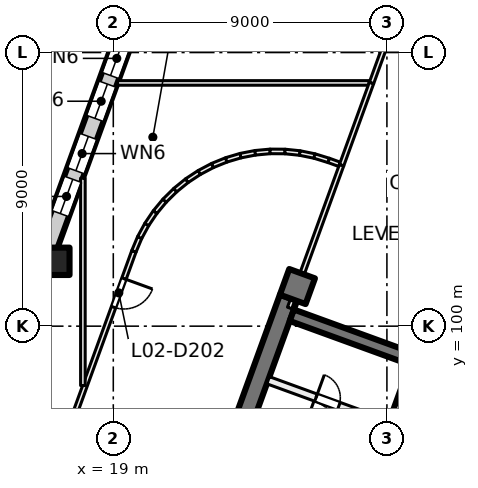
"""IFC4 building model, lengths in metres.
Left out: names, types, materials, properties, quantities, classifications, styles, units other than length and angle.
Written with IfcOpenShell. Run it as: python <this file> out.ifc"""

import sys

from ifc_helpers import new_model, si_unit, direction, frame, frame_2d, origin, origin_2d, place, context, subcontext, project, spatial, rectangle, extrude, element, fill, save


model = new_model("IFC4")
c1 = context("Model", 3, precision=1e-05, world=origin(), true_north=direction((0.0, 1.0)))
c2 = subcontext(c1, "Body", "Model", "MODEL_VIEW")
j1 = project(units=[si_unit("LENGTHUNIT", "METRE"), si_unit("PLANEANGLEUNIT", "RADIAN")], contexts=[c1])
p1 = place(None, origin())
s1 = spatial("IfcSite", under=j1, at=p1, CompositionType="ELEMENT")
p2 = place(p1, origin())
s2 = spatial("IfcBuilding", under=s1, at=p2, CompositionType="ELEMENT")
p3 = place(p2, frame((0.0, 0.0, 12.5)))
s3 = spatial("IfcBuildingStorey", under=s2, at=p3, CompositionType="ELEMENT", Elevation=12.5)
for number, where, z_axis, x_axis in (
    (1, (17.111, 102.133, 0.0), (0.0, 0.0, 1.0), (1.0, 0.0, 0.0)),
    (2, (25.056, 101.303, 0.0), (0.0, 0.0, 1.0), (-0.342, -0.94, 0.0)),
):
    element("IfcColumn", number, at=place(p3, frame(where, z_axis=z_axis, x_axis=x_axis)), inside=s3, PredefinedType="COLUMN", context=c2, shape_type="SweptSolid", body=[
        extrude(rectangle(XDim=0.9, YDim=0.9, at=origin_2d()), origin(), (0.0, 0.0, 1.0), 5.0),
    ])
p4 = place(p3, frame((21.717, 92.568, 0.0), z_axis=(0.0, 0.0, 1.0), x_axis=(0.342016162452, 0.939694069696, 0.0)))
e3 = element("IfcWall", 3, at=p4, inside=s3, PredefinedType="SHEAR", context=c2, shape_type="SweptSolid", body=[
    extrude(rectangle(XDim=8.9, YDim=0.6, at=frame_2d((4.45, 0.0))), origin(), (0.0, 0.0, 1.0), 5.0),
])
p5 = place(p3, frame((32.953, 97.418, 0.0), z_axis=(0.0, 0.0, 1.0), x_axis=(-0.93969060187, 0.342025690201, 0.0)))
e4 = element("IfcWall", 4, at=p5, inside=s3, PredefinedType="SHEAR", context=c2, shape_type="SweptSolid", body=[
    extrude(rectangle(XDim=8.6, YDim=0.4, at=frame_2d((4.3, 0.0))), origin(), (0.0, 0.0, 1.0), 5.0),
])
p6 = place(p3, frame((12.199, 89.809, 0.0), z_axis=(0.0, 0.0, 1.0), x_axis=(0.342022998908, 0.939691581434, 0.0)))
e5 = element("IfcWall", 5, at=p6, inside=s3, PredefinedType="SOLIDWALL", context=c2, shape_type="SweptSolid", body=[
    extrude(rectangle(XDim=47.334, YDim=0.6, at=frame_2d((23.667, 0.0))), origin(), (0.0, 0.0, 1.0), 4.6),
])
p7 = place(p6, frame((0.773, 0.0, 0.9)))
e6 = element("IfcOpeningElement", 6, at=p7, cuts=e5, PredefinedType="OPENING", context=c2, shape_type="SweptSolid", body=[
    extrude(rectangle(XDim=3.0, YDim=3.0, at=frame_2d((1.5, 1.5))), frame((0.0, 0.31, 0.0), z_axis=(0.0, -1.0, 0.0), x_axis=(1.0, 0.0, 0.0)), (0.0, 0.0, 1.0), 0.62),
])
p8 = place(p6, frame((5.379, 0.0, 0.9)))
e7 = element("IfcOpeningElement", 7, at=p8, cuts=e5, PredefinedType="OPENING", context=c2, shape_type="SweptSolid", body=[
    extrude(rectangle(XDim=3.0, YDim=3.0, at=frame_2d((1.5, 1.5))), frame((0.0, 0.31, 0.0), z_axis=(0.0, -1.0, 0.0), x_axis=(1.0, 0.0, 0.0)), (0.0, 0.0, 1.0), 0.62),
])
p9 = place(p6, frame((9.235, 0.0, 0.9)))
e8 = element("IfcOpeningElement", 8, at=p9, cuts=e5, PredefinedType="OPENING", context=c2, shape_type="SweptSolid", body=[
    extrude(rectangle(XDim=3.0, YDim=3.0, at=frame_2d((1.5, 1.5))), frame((0.0, 0.31, 0.0), z_axis=(0.0, -1.0, 0.0), x_axis=(1.0, 0.0, 0.0)), (0.0, 0.0, 1.0), 0.62),
])
p10 = place(p6, frame((14.786, 0.0, 0.9)))
e9 = element("IfcOpeningElement", 9, at=p10, cuts=e5, PredefinedType="OPENING", context=c2, shape_type="SweptSolid", body=[
    extrude(rectangle(XDim=1.2, YDim=3.0, at=frame_2d((0.6, 1.5))), frame((0.0, 0.31, 0.0), z_axis=(0.0, -1.0, 0.0), x_axis=(1.0, 0.0, 0.0)), (0.0, 0.0, 1.0), 0.62),
])
p11 = place(p6, frame((16.286, 0.0, 0.9)))
e10 = element("IfcOpeningElement", 10, at=p11, cuts=e5, PredefinedType="OPENING", context=c2, shape_type="SweptSolid", body=[
    extrude(rectangle(XDim=1.2, YDim=3.0, at=frame_2d((0.6, 1.5))), frame((0.0, 0.31, 0.0), z_axis=(0.0, -1.0, 0.0), x_axis=(1.0, 0.0, 0.0)), (0.0, 0.0, 1.0), 0.62),
])
p12 = place(p6, frame((18.118, 0.0, 0.9)))
e11 = element("IfcOpeningElement", 11, at=p12, cuts=e5, PredefinedType="OPENING", context=c2, shape_type="SweptSolid", body=[
    extrude(rectangle(XDim=1.2, YDim=3.0, at=frame_2d((0.6, 1.5))), frame((0.0, 0.31, 0.0), z_axis=(0.0, -1.0, 0.0), x_axis=(1.0, 0.0, 0.0)), (0.0, 0.0, 1.0), 0.62),
])
p13 = place(p6, frame((19.618, 0.0, 0.9)))
e12 = element("IfcOpeningElement", 12, at=p13, cuts=e5, PredefinedType="OPENING", context=c2, shape_type="SweptSolid", body=[
    extrude(rectangle(XDim=1.2, YDim=3.0, at=frame_2d((0.6, 1.5))), frame((0.0, 0.31, 0.0), z_axis=(0.0, -1.0, 0.0), x_axis=(1.0, 0.0, 0.0)), (0.0, 0.0, 1.0), 0.62),
])
p14 = place(p6, frame((22.452, 0.0, 0.9)))
e13 = element("IfcOpeningElement", 13, at=p14, cuts=e5, PredefinedType="OPENING", context=c2, shape_type="SweptSolid", body=[
    extrude(rectangle(XDim=3.0, YDim=3.0, at=frame_2d((1.5, 1.5))), frame((0.0, 0.31, 0.0), z_axis=(0.0, -1.0, 0.0), x_axis=(1.0, 0.0, 0.0)), (0.0, 0.0, 1.0), 0.62),
])
p15 = place(p6, frame((26.458, 0.0, 0.9)))
e14 = element("IfcOpeningElement", 14, at=p15, cuts=e5, PredefinedType="OPENING", context=c2, shape_type="SweptSolid", body=[
    extrude(rectangle(XDim=3.0, YDim=3.0, at=frame_2d((1.5, 1.5))), frame((0.0, 0.31, 0.0), z_axis=(0.0, -1.0, 0.0), x_axis=(1.0, 0.0, 0.0)), (0.0, 0.0, 1.0), 0.62),
])
p16 = place(p6, frame((31.064, 0.0, 0.9)))
e15 = element("IfcOpeningElement", 15, at=p16, cuts=e5, PredefinedType="OPENING", context=c2, shape_type="SweptSolid", body=[
    extrude(rectangle(XDim=3.0, YDim=3.0, at=frame_2d((1.5, 1.5))), frame((0.0, 0.31, 0.0), z_axis=(0.0, -1.0, 0.0), x_axis=(1.0, 0.0, 0.0)), (0.0, 0.0, 1.0), 0.62),
])
p17 = place(p6, frame((36.029, 0.0, 0.9)))
e16 = element("IfcOpeningElement", 16, at=p17, cuts=e5, PredefinedType="OPENING", context=c2, shape_type="SweptSolid", body=[
    extrude(rectangle(XDim=1.2, YDim=3.0, at=frame_2d((0.6, 1.5))), frame((0.0, 0.31, 0.0), z_axis=(0.0, -1.0, 0.0), x_axis=(1.0, 0.0, 0.0)), (0.0, 0.0, 1.0), 0.62),
])
p18 = place(p6, frame((39.676, 0.0, 0.9)))
e17 = element("IfcOpeningElement", 17, at=p18, cuts=e5, PredefinedType="OPENING", context=c2, shape_type="SweptSolid", body=[
    extrude(rectangle(XDim=3.0, YDim=3.0, at=frame_2d((1.5, 1.5))), frame((0.0, 0.31, 0.0), z_axis=(0.0, -1.0, 0.0), x_axis=(1.0, 0.0, 0.0)), (0.0, 0.0, 1.0), 0.62),
])
p19 = place(p6, frame((43.531, 0.0, 0.9)))
e18 = element("IfcOpeningElement", 18, at=p19, cuts=e5, PredefinedType="OPENING", context=c2, shape_type="SweptSolid", body=[
    extrude(rectangle(XDim=3.0, YDim=3.0, at=frame_2d((1.5, 1.5))), frame((0.0, 0.31, 0.0), z_axis=(0.0, -1.0, 0.0), x_axis=(1.0, 0.0, 0.0)), (0.0, 0.0, 1.0), 0.62),
])
p20 = place(p3, frame((24.094, 98.221, 0.0), z_axis=(0.0, 0.0, 1.0), x_axis=(0.939691552312, -0.342023078919, 0.0)))
e19 = element("IfcWall", 19, at=p20, inside=s3, PredefinedType="PARTITIONING", context=c2, shape_type="SweptSolid", body=[
    extrude(rectangle(XDim=8.4, YDim=0.25, at=frame_2d((4.2, 0.0))), origin(), (0.0, 0.0, 1.0), 4.6),
])
p21 = place(p20, frame((5.925, 0.0, 0.0)))
e20 = element("IfcOpeningElement", 20, at=p21, cuts=e19, PredefinedType="OPENING", context=c2, shape_type="SweptSolid", body=[
    extrude(rectangle(XDim=0.8, YDim=2.1, at=frame_2d((0.4, 1.05))), frame((0.0, 0.135, 0.0), z_axis=(0.0, -1.0, 0.0), x_axis=(1.0, 0.0, 0.0)), (0.0, 0.0, 1.0), 0.27),
])
p22 = place(p20, frame((1.675, 0.0, 0.0)))
e21 = element("IfcOpeningElement", 21, at=p22, cuts=e19, PredefinedType="OPENING", context=c2, shape_type="SweptSolid", body=[
    extrude(rectangle(XDim=0.8, YDim=2.1, at=frame_2d((0.4, 1.05))), frame((0.0, 0.135, 0.0), z_axis=(0.0, -1.0, 0.0), x_axis=(1.0, 0.0, 0.0)), (0.0, 0.0, 1.0), 0.27),
])
p23 = place(p3, frame((28.083, 96.902, 0.0), z_axis=(0.0, 0.0, 1.0), x_axis=(0.342024501273, 0.939691034611, 0.0)))
e22 = element("IfcWall", 22, at=p23, inside=s3, PredefinedType="PARTITIONING", context=c2, shape_type="SweptSolid", body=[
    extrude(rectangle(XDim=1.95, YDim=0.1, at=frame_2d((0.975, 0.0))), origin(), (0.0, 0.0, 1.0), 4.6),
])
p24 = place(p3, frame((15.169, 90.075, 0.0), z_axis=(0.0, 0.0, 1.0), x_axis=(0.342068648332, 0.93967496499, 0.0)))
e23 = element("IfcWall", 23, at=p24, inside=s3, PredefinedType="PARTITIONING", context=c2, shape_type="SweptSolid", body=[
    extrude(rectangle(XDim=13.185, YDim=0.15, at=frame_2d((6.592, 0.0))), origin(), (0.0, 0.0, 1.0), 4.6),
])
p25 = place(p24, frame((3.604, 0.0, 0.0)))
e24 = element("IfcOpeningElement", 24, at=p25, cuts=e23, PredefinedType="OPENING", context=c2, shape_type="SweptSolid", body=[
    extrude(rectangle(XDim=1.0, YDim=2.1, at=frame_2d((0.5, 1.05))), frame((0.0, 0.085, 0.0), z_axis=(0.0, -1.0, 0.0), x_axis=(1.0, 0.0, 0.0)), (0.0, 0.0, 1.0), 0.17),
])
p26 = place(p24, frame((11.227, 0.0, 0.0)))
e25 = element("IfcOpeningElement", 25, at=p26, cuts=e23, PredefinedType="OPENING", context=c2, shape_type="SweptSolid", body=[
    extrude(rectangle(XDim=1.0, YDim=2.1, at=frame_2d((0.5, 1.05))), frame((0.0, 0.085, 0.0), z_axis=(0.0, -1.0, 0.0), x_axis=(1.0, 0.0, 0.0)), (0.0, 0.0, 1.0), 0.17),
])
p27 = place(p3, frame((18.0, 98.046, 0.0), z_axis=(0.0, 0.0, 1.0), x_axis=(0.0, 1.0, 0.0)))
e26 = element("IfcWall", 26, at=p27, inside=s3, PredefinedType="PARTITIONING", context=c2, shape_type="SweptSolid", body=[
    extrude(rectangle(XDim=6.823, YDim=0.15, at=frame_2d((3.412, 0.0))), origin(), (0.0, 0.0, 1.0), 4.6),
])
p28 = place(p3, frame((19.14, 108.0, 0.0), z_axis=(0.0, 0.0, 1.0), x_axis=(1.0, 0.0, 0.0)))
e27 = element("IfcWall", 27, at=p28, inside=s3, PredefinedType="PARTITIONING", context=c2, shape_type="SweptSolid", body=[
    extrude(rectangle(XDim=8.274, YDim=0.15, at=frame_2d((4.137, 0.0))), origin(), (0.0, 0.0, 1.0), 4.6),
])
p29 = place(p3, frame((19.677, 102.46, 0.0), z_axis=(0.0, 0.0, 1.0), x_axis=(0.386429931229, 0.922318767157, 0.0)))
e28 = element("IfcWall", 28, at=p29, inside=s3, PredefinedType="PARTITIONING", context=c2, shape_type="SweptSolid", body=[
    extrude(rectangle(XDim=0.497, YDim=0.15, at=frame_2d((0.248, 0.0))), origin(), (0.0, 0.0, 1.0), 4.6),
])
p30 = place(p3, frame((19.866, 102.912, 0.0), z_axis=(0.0, 0.0, 1.0), x_axis=(0.478336447807, 0.878176658025, 0.0)))
e29 = element("IfcWall", 29, at=p30, inside=s3, PredefinedType="PARTITIONING", context=c2, shape_type="SweptSolid", body=[
    extrude(rectangle(XDim=0.498, YDim=0.15, at=frame_2d((0.249, 0.0))), origin(), (0.0, 0.0, 1.0), 4.6),
])
p31 = place(p3, frame((20.1, 103.343, 0.0), z_axis=(0.0, 0.0, 1.0), x_axis=(0.559439200494, 0.828871389874, 0.0)))
e30 = element("IfcWall", 30, at=p31, inside=s3, PredefinedType="PARTITIONING", context=c2, shape_type="SweptSolid", body=[
    extrude(rectangle(XDim=0.498, YDim=0.15, at=frame_2d((0.249, 0.0))), origin(), (0.0, 0.0, 1.0), 4.6),
])
p32 = place(p3, frame((20.375, 103.75, 0.0), z_axis=(0.0, 0.0, 1.0), x_axis=(0.637426997618, 0.77051075444, 0.0)))
e31 = element("IfcWall", 31, at=p32, inside=s3, PredefinedType="PARTITIONING", context=c2, shape_type="SweptSolid", body=[
    extrude(rectangle(XDim=0.497, YDim=0.15, at=frame_2d((0.249, 0.0))), origin(), (0.0, 0.0, 1.0), 4.6),
])
p33 = place(p3, frame((20.687, 104.127, 0.0), z_axis=(0.0, 0.0, 1.0), x_axis=(0.711007970504, 0.703183948821, 0.0)))
e32 = element("IfcWall", 32, at=p33, inside=s3, PredefinedType="PARTITIONING", context=c2, shape_type="SweptSolid", body=[
    extrude(rectangle(XDim=0.499, YDim=0.15, at=frame_2d((0.25, 0.0))), origin(), (0.0, 0.0, 1.0), 4.6),
])
p34 = place(p3, frame((21.036, 104.473, 0.0), z_axis=(0.0, 0.0, 1.0), x_axis=(0.77650322697, 0.630113274345, 0.0)))
e33 = element("IfcWall", 33, at=p34, inside=s3, PredefinedType="PARTITIONING", context=c2, shape_type="SweptSolid", body=[
    extrude(rectangle(XDim=0.499, YDim=0.15, at=frame_2d((0.249, 0.0))), origin(), (0.0, 0.0, 1.0), 4.6),
])
for number, where, z_axis, x_axis in (
    (34, (21.417, 104.783, 0.0), (0.0, 0.0, 1.0), (0.835, 0.55, 0.0)),
    (35, (21.827, 105.053, 0.0), (0.0, 0.0, 1.0), (0.884, 0.468, 0.0)),
):
    element("IfcWall", number, at=place(p3, frame(where, z_axis=z_axis, x_axis=x_axis)), inside=s3, PredefinedType="PARTITIONING", context=c2, shape_type="SweptSolid", body=[
        extrude(rectangle(XDim=0.498, YDim=0.15, at=frame_2d((0.249, 0.0))), origin(), (0.0, 0.0, 1.0), 4.6),
    ])
p35 = place(p3, frame((22.261, 105.283, 0.0), z_axis=(0.0, 0.0, 1.0), x_axis=(0.926359379867, 0.376640809436, 0.0)))
e36 = element("IfcWall", 36, at=p35, inside=s3, PredefinedType="PARTITIONING", context=c2, shape_type="SweptSolid", body=[
    extrude(rectangle(XDim=0.497, YDim=0.15, at=frame_2d((0.248, 0.0))), origin(), (0.0, 0.0, 1.0), 4.6),
])
p36 = place(p3, frame((22.714, 105.468, 0.0), z_axis=(0.0, 0.0, 1.0), x_axis=(0.958511041414, 0.285055404243, 0.0)))
e37 = element("IfcWall", 37, at=p36, inside=s3, PredefinedType="PARTITIONING", context=c2, shape_type="SweptSolid", body=[
    extrude(rectangle(XDim=0.499, YDim=0.15, at=frame_2d((0.249, 0.0))), origin(), (0.0, 0.0, 1.0), 4.6),
])
p37 = place(p3, frame((23.184, 105.608, 0.0), z_axis=(0.0, 0.0, 1.0), x_axis=(0.981729772821, 0.190280459207, 0.0)))
e38 = element("IfcWall", 38, at=p37, inside=s3, PredefinedType="PARTITIONING", context=c2, shape_type="SweptSolid", body=[
    extrude(rectangle(XDim=0.499, YDim=0.15, at=frame_2d((0.25, 0.0))), origin(), (0.0, 0.0, 1.0), 4.6),
])
p38 = place(p3, frame((23.666, 105.702, 0.0), z_axis=(0.0, 0.0, 1.0), x_axis=(0.995719029091, 0.092431678044, 0.0)))
e39 = element("IfcWall", 39, at=p38, inside=s3, PredefinedType="PARTITIONING", context=c2, shape_type="SweptSolid", body=[
    extrude(rectangle(XDim=0.499, YDim=0.15, at=frame_2d((0.25, 0.0))), origin(), (0.0, 0.0, 1.0), 4.6),
])
p39 = place(p3, frame((24.155, 105.748, 0.0), z_axis=(0.0, 0.0, 1.0), x_axis=(0.999982699411, -0.005882251173, 0.0)))
e40 = element("IfcWall", 40, at=p39, inside=s3, PredefinedType="PARTITIONING", context=c2, shape_type="SweptSolid", body=[
    extrude(rectangle(XDim=0.498, YDim=0.15, at=frame_2d((0.249, 0.0))), origin(), (0.0, 0.0, 1.0), 4.6),
])
p40 = place(p3, frame((24.645, 105.745, 0.0), z_axis=(0.0, 0.0, 1.0), x_axis=(0.994752095055, -0.102314560958, 0.0)))
e41 = element("IfcWall", 41, at=p40, inside=s3, PredefinedType="PARTITIONING", context=c2, shape_type="SweptSolid", body=[
    extrude(rectangle(XDim=0.499, YDim=0.15, at=frame_2d((0.25, 0.0))), origin(), (0.0, 0.0, 1.0), 4.6),
])
p41 = place(p3, frame((24.8, 100.598, 0.0), z_axis=(0.0, 0.0, 1.0), x_axis=(0.34194689438, 0.939719277989, 0.0)))
e42 = element("IfcWall", 42, at=p41, inside=s3, PredefinedType="PARTITIONING", context=c2, shape_type="SweptSolid", body=[
    extrude(rectangle(XDim=5.001, YDim=0.15, at=frame_2d((2.5, 0.0))), origin(), (0.0, 0.0, 1.0), 4.6),
])
p42 = place(p3, frame((25.133, 105.695, 0.0), z_axis=(0.0, 0.0, 1.0), x_axis=(0.979686550711, -0.200534940485, 0.0)))
e43 = element("IfcWall", 43, at=p42, inside=s3, PredefinedType="PARTITIONING", context=c2, shape_type="SweptSolid", body=[
    extrude(rectangle(XDim=0.499, YDim=0.15, at=frame_2d((0.25, 0.0))), origin(), (0.0, 0.0, 1.0), 4.6),
])
p43 = place(p3, frame((25.614, 105.597, 0.0), z_axis=(0.0, 0.0, 1.0), x_axis=(0.955332101268, -0.29553439104, 0.0)))
e44 = element("IfcWall", 44, at=p43, inside=s3, PredefinedType="PARTITIONING", context=c2, shape_type="SweptSolid", body=[
    extrude(rectangle(XDim=0.497, YDim=0.15, at=frame_2d((0.249, 0.0))), origin(), (0.0, 0.0, 1.0), 4.6),
])
p44 = place(p3, frame((26.085, 105.452, 0.0), z_axis=(0.0, 0.0, 1.0), x_axis=(0.939944328342, -0.341327789109, 0.0)))
e45 = element("IfcWall", 45, at=p44, inside=s3, PredefinedType="PARTITIONING", context=c2, shape_type="SweptSolid", body=[
    extrude(rectangle(XDim=0.378, YDim=0.15, at=frame_2d((0.189, 0.0))), origin(), (0.0, 0.0, 1.0), 4.6),
])
p45 = place(p3, frame((26.51, 105.297, 0.0), z_axis=(0.0, 0.0, 1.0), x_axis=(0.342056533425, 0.939679375075, 0.0)))
e46 = element("IfcWall", 46, at=p45, inside=s3, PredefinedType="PARTITIONING", context=c2, shape_type="SweptSolid", body=[
    extrude(rectangle(XDim=2.876, YDim=0.15, at=frame_2d((1.438, 0.0))), origin(), (0.0, 0.0, 1.0), 4.6),
])
p46 = place(p3, frame((27.494, 108.0, 0.0), z_axis=(0.0, 0.0, 1.0), x_axis=(0.341841854689, 0.93975749339, 0.0)))
e47 = element("IfcWall", 47, at=p46, inside=s3, PredefinedType="PARTITIONING", context=c2, shape_type="SweptSolid", body=[
    extrude(rectangle(XDim=3.373, YDim=0.15, at=frame_2d((1.687, 0.0))), origin(), (0.0, 0.0, 1.0), 4.6),
])
p47 = place(p10, origin())
e48 = element("IfcWindow", 48, at=p47, inside=s3, PartitioningType="SINGLE_PANEL", PredefinedType="WINDOW", context=c2, shape_type="SweptSolid", body=[
    extrude(rectangle(XDim=1.2, YDim=3.0, at=frame_2d((0.6, 1.5))), frame((0.0, 0.03, 0.0), z_axis=(0.0, -1.0, 0.0), x_axis=(1.0, 0.0, 0.0)), (0.0, 0.0, 1.0), 0.06),
])
fill(e9, e48)
p48 = place(p11, origin())
e49 = element("IfcWindow", 49, at=p48, inside=s3, PartitioningType="SINGLE_PANEL", PredefinedType="WINDOW", context=c2, shape_type="SweptSolid", body=[
    extrude(rectangle(XDim=1.2, YDim=3.0, at=frame_2d((0.6, 1.5))), frame((0.0, 0.03, 0.0), z_axis=(0.0, -1.0, 0.0), x_axis=(1.0, 0.0, 0.0)), (0.0, 0.0, 1.0), 0.06),
])
fill(e10, e49)
p49 = place(p12, origin())
e50 = element("IfcWindow", 50, at=p49, inside=s3, PartitioningType="SINGLE_PANEL", PredefinedType="WINDOW", context=c2, shape_type="SweptSolid", body=[
    extrude(rectangle(XDim=1.2, YDim=3.0, at=frame_2d((0.6, 1.5))), frame((0.0, 0.03, 0.0), z_axis=(0.0, -1.0, 0.0), x_axis=(1.0, 0.0, 0.0)), (0.0, 0.0, 1.0), 0.06),
])
fill(e11, e50)
p50 = place(p13, origin())
e51 = element("IfcWindow", 51, at=p50, inside=s3, PartitioningType="SINGLE_PANEL", PredefinedType="WINDOW", context=c2, shape_type="SweptSolid", body=[
    extrude(rectangle(XDim=1.2, YDim=3.0, at=frame_2d((0.6, 1.5))), frame((0.0, 0.03, 0.0), z_axis=(0.0, -1.0, 0.0), x_axis=(1.0, 0.0, 0.0)), (0.0, 0.0, 1.0), 0.06),
])
fill(e12, e51)
p51 = place(p22, origin())
e52 = element("IfcDoor", 52, at=p51, inside=s3, OperationType="SINGLE_SWING_RIGHT", PredefinedType="DOOR", context=c2, shape_type="SweptSolid", body=[
    extrude(rectangle(XDim=0.8, YDim=2.1, at=frame_2d((0.4, 1.05))), frame((0.0, 0.025, 0.0), z_axis=(0.0, -1.0, 0.0), x_axis=(1.0, 0.0, 0.0)), (0.0, 0.0, 1.0), 0.05),
])
fill(e21, e52)
p52 = place(p26, origin())
e53 = element("IfcDoor", 53, at=p52, inside=s3, OperationType="SINGLE_SWING_RIGHT", PredefinedType="DOOR", context=c2, shape_type="SweptSolid", body=[
    extrude(rectangle(XDim=1.0, YDim=2.1, at=frame_2d((0.5, 1.05))), frame((0.0, 0.025, 0.0), z_axis=(0.0, -1.0, 0.0), x_axis=(1.0, 0.0, 0.0)), (0.0, 0.0, 1.0), 0.05),
])
fill(e25, e53)
save(model, sys.argv[1])
